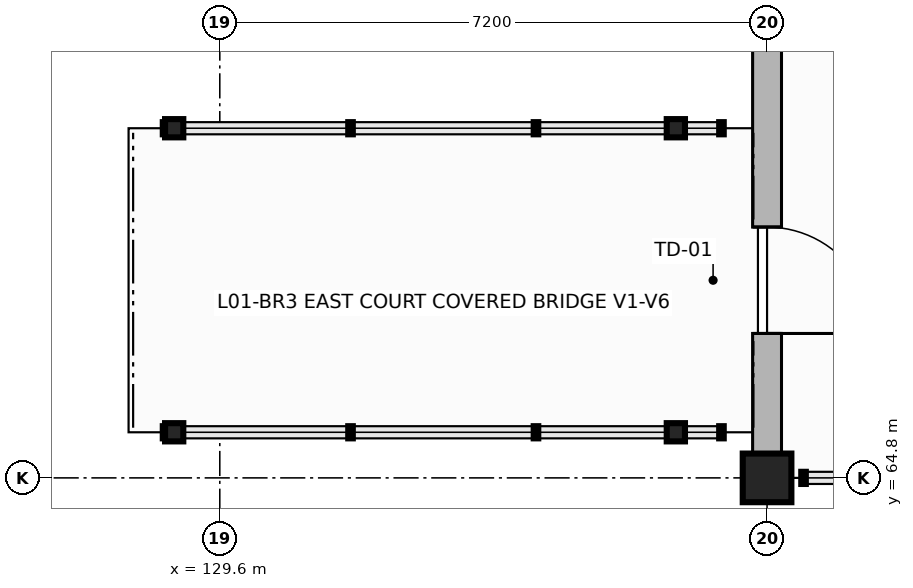
"""IFC4 building model, lengths in metres.
Left out: names, types, materials, properties, quantities, classifications, styles, units other than length and angle.
Written with IfcOpenShell. Run it as: python <this file> out.ifc"""

import sys

from ifc_helpers import new_model, si_unit, direction, frame, frame_2d, origin, origin_2d, place, context, subcontext, project, spatial, rectangle, i_section, extrude, element, fill, save


model = new_model("IFC4")
c1 = context("Model", 3, precision=1e-05, world=origin(), true_north=direction((0.0, 1.0)))
c2 = subcontext(c1, "Body", "Model", "MODEL_VIEW")
j1 = project(units=[si_unit("LENGTHUNIT", "METRE"), si_unit("PLANEANGLEUNIT", "RADIAN")], contexts=[c1])
p1 = place(None, origin())
s1 = spatial("IfcSite", under=j1, at=p1, CompositionType="ELEMENT")
p2 = place(p1, origin())
s2 = spatial("IfcBuilding", under=s1, at=p2, CompositionType="ELEMENT")
p3 = place(p2, frame((0.0, 0.0, 4.5)))
s3 = spatial("IfcBuildingStorey", under=s2, at=p3, CompositionType="ELEMENT", Elevation=4.5)
p4 = place(p3, frame((136.8, 64.8, 0.0), z_axis=(0.0, 0.0, 1.0), x_axis=(1.0, 0.0, 0.0)))
e1 = element("IfcColumn", 1, at=p4, inside=s3, PredefinedType="COLUMN", context=c2, shape_type="SweptSolid", body=[
    extrude(rectangle(XDim=0.64, YDim=0.64, at=origin_2d()), origin(), (0.0, 0.0, 1.0), 3.58),
])
for number, where, z_axis, x_axis in (
    (2, (129.0, 65.4, 0.0), (0.0, 0.0, 1.0), (1.0, 0.0, 0.0)),
    (3, (129.0, 69.4, 0.0), (0.0, 0.0, 1.0), (1.0, 0.0, 0.0)),
    (4, (135.6, 65.4, 0.0), (0.0, 0.0, 1.0), (1.0, 0.0, 0.0)),
    (5, (135.6, 69.4, 0.0), (0.0, 0.0, 1.0), (1.0, 0.0, 0.0)),
):
    element("IfcColumn", number, at=place(p3, frame(where, z_axis=z_axis, x_axis=x_axis)), inside=s3, PredefinedType="COLUMN", context=c2, shape_type="SweptSolid", body=[
        extrude(i_section(OverallWidth=0.24, OverallDepth=0.24, WebThickness=0.01, FlangeThickness=0.017, FilletRadius=0.021, at=origin_2d()), origin(), (0.0, 0.0, 1.0), 3.68),
    ])
p5 = place(p3, frame((136.8, 72.0, 0.0), z_axis=(0.0, 0.0, 1.0), x_axis=(0.0, -1.0, 0.0)))
e6 = element("IfcWall", 6, at=p5, inside=s3, PredefinedType="SOLIDWALL", context=c2, shape_type="SweptSolid", body=[
    extrude(rectangle(XDim=7.2, YDim=0.38, at=frame_2d((3.6, 0.0))), origin(), (0.0, 0.0, 1.0), 2.91),
])
p6 = place(p5, frame((3.9, 0.0, 0.0)))
e7 = element("IfcOpeningElement", 7, at=p6, cuts=e6, PredefinedType="OPENING", context=c2, shape_type="SweptSolid", body=[
    extrude(rectangle(XDim=1.4, YDim=2.25, at=frame_2d((0.7, 1.125))), frame((0.0, 0.2, 0.0), z_axis=(0.0, -1.0, 0.0), x_axis=(1.0, 0.0, 0.0)), (0.0, 0.0, 1.0), 0.4),
])
p7 = place(p6, origin())
e8 = element("IfcDoor", 8, at=p7, inside=s3, OperationType="SINGLE_SWING_RIGHT", PredefinedType="DOOR", context=c2, shape_type="SweptSolid", body=[
    extrude(rectangle(XDim=1.4, YDim=2.25, at=frame_2d((0.7, 1.125))), frame((0.0, 0.025, 0.0), z_axis=(0.0, -1.0, 0.0), x_axis=(1.0, 0.0, 0.0)), (0.0, 0.0, 1.0), 0.05),
])
fill(e7, e8)
save(model, sys.argv[1])
